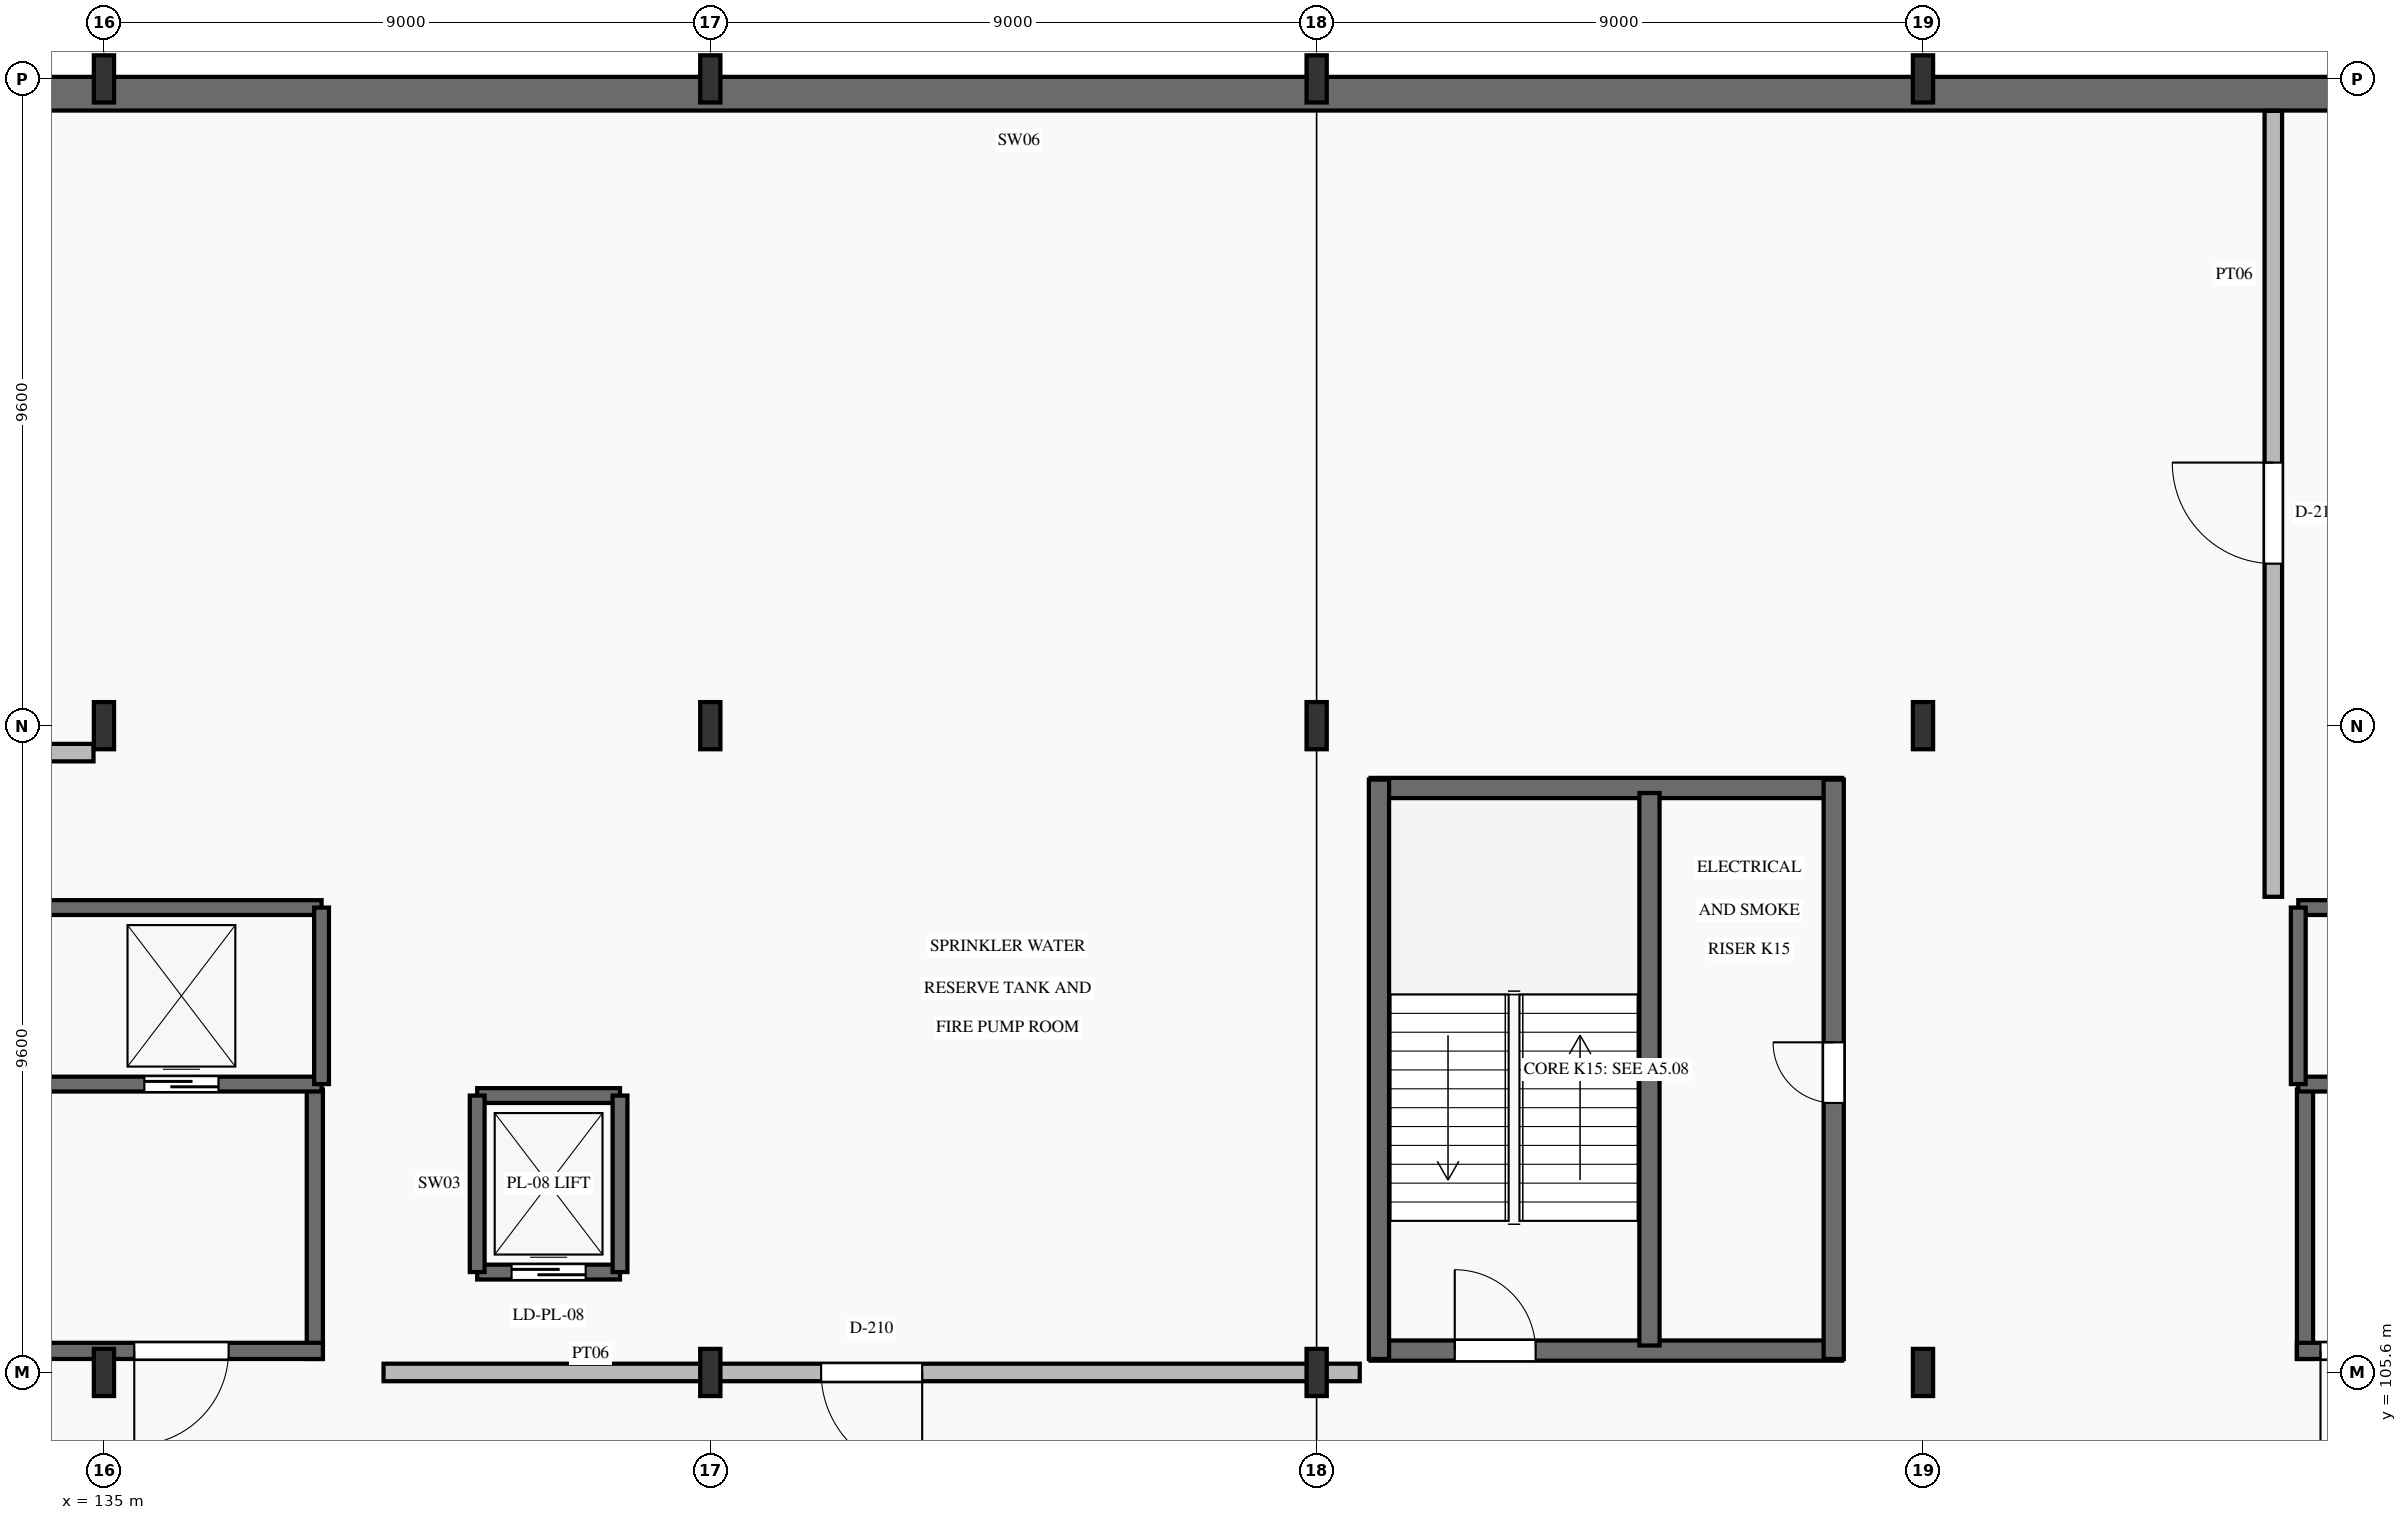
"""IFC4 building model, lengths in metres.
Left out: names, types, materials, properties, quantities, classifications, styles, units other than length and angle.
Written with IfcOpenShell. Run it as: python <this file> out.ifc"""

import sys

from ifc_helpers import new_model, si_unit, direction, frame, frame_2d, origin, origin_2d, place, context, subcontext, project, spatial, rectangle, i_section, extrude, element, fill, save


model = new_model("IFC4")
c1 = context("Model", 3, precision=1e-05, world=origin(), true_north=direction((0.0, 1.0)))
c2 = subcontext(c1, "Body", "Model", "MODEL_VIEW")
j1 = project(units=[si_unit("LENGTHUNIT", "METRE"), si_unit("PLANEANGLEUNIT", "RADIAN")], contexts=[c1])
p1 = place(None, origin())
s1 = spatial("IfcSite", under=j1, at=p1, CompositionType="ELEMENT")
p2 = place(p1, origin())
s2 = spatial("IfcBuilding", under=s1, at=p2, CompositionType="ELEMENT")
p3 = place(p2, frame((0.0, 0.0, -4.5)))
s3 = spatial("IfcBuildingStorey", under=s2, at=p3, CompositionType="ELEMENT", Elevation=-4.5)
for number, where, z_axis, x_axis in (
    (1, (135.0, 105.6, 0.0), (0.0, 0.0, 1.0), (1.0, 0.0, 0.0)),
    (2, (135.0, 115.2, 0.0), (0.0, 0.0, 1.0), (1.0, 0.0, 0.0)),
    (3, (135.0, 124.8, 0.0), (0.0, 0.0, 1.0), (1.0, 0.0, 0.0)),
    (4, (144.0, 105.6, 0.0), (0.0, 0.0, 1.0), (1.0, 0.0, 0.0)),
    (5, (144.0, 115.2, 0.0), (0.0, 0.0, 1.0), (1.0, 0.0, 0.0)),
    (6, (144.0, 124.8, 0.0), (0.0, 0.0, 1.0), (1.0, 0.0, 0.0)),
    (7, (153.0, 105.6, 0.0), (0.0, 0.0, 1.0), (1.0, 0.0, 0.0)),
    (8, (153.0, 115.2, 0.0), (0.0, 0.0, 1.0), (1.0, 0.0, 0.0)),
    (9, (153.0, 124.8, 0.0), (0.0, 0.0, 1.0), (1.0, 0.0, 0.0)),
    (10, (162.0, 105.6, 0.0), (0.0, 0.0, 1.0), (1.0, 0.0, 0.0)),
    (11, (162.0, 115.2, 0.0), (0.0, 0.0, 1.0), (1.0, 0.0, 0.0)),
    (12, (162.0, 124.8, 0.0), (0.0, 0.0, 1.0), (1.0, 0.0, 0.0)),
):
    element("IfcColumn", number, at=place(p3, frame(where, z_axis=z_axis, x_axis=x_axis)), inside=s3, PredefinedType="COLUMN", context=c2, shape_type="SweptSolid", body=[
        extrude(i_section(OverallWidth=0.3, OverallDepth=0.7, WebThickness=0.017, FlangeThickness=0.032, FilletRadius=0.027, at=origin_2d()), origin(), (0.0, 0.0, 1.0), 4.5),
    ])
p4 = place(p3, frame((179.78, 124.58, 0.0), z_axis=(0.0, 0.0, 1.0), x_axis=(-1.0, 0.0, 0.0)))
e13 = element("IfcWall", 13, at=p4, inside=s3, PredefinedType="SHEAR", context=c2, shape_type="SweptSolid", body=[
    extrude(rectangle(XDim=62.4, YDim=0.5, at=frame_2d((31.2, 0.0))), origin(), (0.0, 0.0, 1.0), 4.2),
])
p5 = place(p3, frame((138.13, 105.8, 0.0), z_axis=(0.0, 0.0, 1.0), x_axis=(0.0, 1.0, 0.0)))
e14 = element("IfcWall", 14, at=p5, inside=s3, PredefinedType="SHEAR", context=c2, shape_type="SweptSolid", body=[
    extrude(rectangle(XDim=4.0, YDim=0.24, at=frame_2d((2.0, 0.0))), origin(), (0.0, 0.0, 1.0), 4.5),
])
p6 = place(p3, frame((134.05, 105.92, 0.0), z_axis=(0.0, 0.0, 1.0), x_axis=(1.0, 0.0, 0.0)))
e15 = element("IfcWall", 15, at=p6, inside=s3, PredefinedType="SHEAR", context=c2, shape_type="SweptSolid", body=[
    extrude(rectangle(XDim=4.2, YDim=0.24, at=frame_2d((2.1, 0.0))), origin(), (0.0, 0.0, 1.0), 4.5),
])
p7 = place(p6, frame((1.4, 0.0, 0.0)))
e16 = element("IfcOpeningElement", 16, at=p7, cuts=e15, PredefinedType="OPENING", context=c2, shape_type="SweptSolid", body=[
    extrude(rectangle(XDim=1.4, YDim=2.2, at=frame_2d((0.7, 1.1))), frame((0.0, 0.135, 0.0), z_axis=(0.0, -1.0, 0.0), x_axis=(1.0, 0.0, 0.0)), (0.0, 0.0, 1.0), 0.27),
])
p8 = place(p3, frame((167.67, 105.8, 0.0), z_axis=(0.0, 0.0, 1.0), x_axis=(0.0, 1.0, 0.0)))
e17 = element("IfcWall", 17, at=p8, inside=s3, PredefinedType="SHEAR", context=c2, shape_type="SweptSolid", body=[
    extrude(rectangle(XDim=4.0, YDim=0.24, at=frame_2d((2.0, 0.0))), origin(), (0.0, 0.0, 1.0), 4.5),
])
p9 = place(p3, frame((167.55, 105.92, 0.0), z_axis=(0.0, 0.0, 1.0), x_axis=(1.0, 0.0, 0.0)))
e18 = element("IfcWall", 18, at=p9, inside=s3, PredefinedType="SHEAR", context=c2, shape_type="SweptSolid", body=[
    extrude(rectangle(XDim=4.2, YDim=0.24, at=frame_2d((2.1, 0.0))), origin(), (0.0, 0.0, 1.0), 4.5),
])
p10 = place(p9, frame((0.35, 0.0, 0.0)))
e19 = element("IfcOpeningElement", 19, at=p10, cuts=e18, PredefinedType="OPENING", context=c2, shape_type="SweptSolid", body=[
    extrude(rectangle(XDim=1.4, YDim=2.2, at=frame_2d((0.7, 1.1))), frame((0.0, 0.135, 0.0), z_axis=(0.0, -1.0, 0.0), x_axis=(1.0, 0.0, 0.0)), (0.0, 0.0, 1.0), 0.27),
])
p11 = place(p3, frame((153.8, 105.925, 0.0), z_axis=(0.0, 0.0, 1.0), x_axis=(1.0, 0.0, 0.0)))
e20 = element("IfcWall", 20, at=p11, inside=s3, PredefinedType="SHEAR", context=c2, shape_type="SweptSolid", body=[
    extrude(rectangle(XDim=7.0, YDim=0.3, at=frame_2d((3.5, 0.0))), origin(), (0.0, 0.0, 1.0), 4.5),
])
p12 = place(p11, frame((1.25, 0.0, 0.0)))
e21 = element("IfcOpeningElement", 21, at=p12, cuts=e20, PredefinedType="OPENING", context=c2, shape_type="SweptSolid", body=[
    extrude(rectangle(XDim=1.2, YDim=2.15, at=frame_2d((0.6, 1.075))), frame((0.0, 0.165, 0.0), z_axis=(0.0, -1.0, 0.0), x_axis=(1.0, 0.0, 0.0)), (0.0, 0.0, 1.0), 0.33),
])
p13 = place(p3, frame((153.8, 114.275, 0.0), z_axis=(0.0, 0.0, 1.0), x_axis=(1.0, 0.0, 0.0)))
e22 = element("IfcWall", 22, at=p13, inside=s3, PredefinedType="SHEAR", context=c2, shape_type="SweptSolid", body=[
    extrude(rectangle(XDim=7.0, YDim=0.3, at=frame_2d((3.5, 0.0))), origin(), (0.0, 0.0, 1.0), 4.5),
])
p14 = place(p3, frame((153.925, 105.8, 0.0), z_axis=(0.0, 0.0, 1.0), x_axis=(0.0, 1.0, 0.0)))
e23 = element("IfcWall", 23, at=p14, inside=s3, PredefinedType="SHEAR", context=c2, shape_type="SweptSolid", body=[
    extrude(rectangle(XDim=8.6, YDim=0.3, at=frame_2d((4.3, 0.0))), origin(), (0.0, 0.0, 1.0), 4.5),
])
p15 = place(p3, frame((160.675, 105.8, 0.0), z_axis=(0.0, 0.0, 1.0), x_axis=(0.0, 1.0, 0.0)))
e24 = element("IfcWall", 24, at=p15, inside=s3, PredefinedType="SHEAR", context=c2, shape_type="SweptSolid", body=[
    extrude(rectangle(XDim=8.6, YDim=0.3, at=frame_2d((4.3, 0.0))), origin(), (0.0, 0.0, 1.0), 4.5),
])
p16 = place(p15, frame((3.8, 0.0, 0.0)))
e25 = element("IfcOpeningElement", 25, at=p16, cuts=e24, PredefinedType="OPENING", context=c2, shape_type="SweptSolid", body=[
    extrude(rectangle(XDim=0.9, YDim=2.05, at=frame_2d((0.45, 1.025))), frame((0.0, 0.165, 0.0), z_axis=(0.0, -1.0, 0.0), x_axis=(1.0, 0.0, 0.0)), (0.0, 0.0, 1.0), 0.33),
])
p17 = place(p3, frame((157.94, 106.0, 0.0), z_axis=(0.0, 0.0, 1.0), x_axis=(0.0, 1.0, 0.0)))
e26 = element("IfcWall", 26, at=p17, inside=s3, PredefinedType="SHEAR", context=c2, shape_type="SweptSolid", body=[
    extrude(rectangle(XDim=8.2, YDim=0.3, at=frame_2d((4.1, 0.0))), origin(), (0.0, 0.0, 1.0), 4.5),
])
p18 = place(p3, frame((140.54, 107.09, 0.0), z_axis=(0.0, 0.0, 1.0), x_axis=(1.0, 0.0, 0.0)))
e27 = element("IfcWall", 27, at=p18, inside=s3, PredefinedType="SHEAR", context=c2, shape_type="SweptSolid", body=[
    extrude(rectangle(XDim=2.12, YDim=0.22, at=frame_2d((1.06, 0.0))), origin(), (0.0, 0.0, 1.0), 4.5),
])
p19 = place(p18, frame((0.51, 0.0, 0.0)))
e28 = element("IfcOpeningElement", 28, at=p19, cuts=e27, PredefinedType="OPENING", context=c2, shape_type="SweptSolid", body=[
    extrude(rectangle(XDim=1.1, YDim=2.15, at=frame_2d((0.55, 1.075))), frame((0.0, 0.125, 0.0), z_axis=(0.0, -1.0, 0.0), x_axis=(1.0, 0.0, 0.0)), (0.0, 0.0, 1.0), 0.25),
])
p20 = place(p3, frame((140.54, 109.71, 0.0), z_axis=(0.0, 0.0, 1.0), x_axis=(1.0, 0.0, 0.0)))
e29 = element("IfcWall", 29, at=p20, inside=s3, PredefinedType="SHEAR", context=c2, shape_type="SweptSolid", body=[
    extrude(rectangle(XDim=2.12, YDim=0.22, at=frame_2d((1.06, 0.0))), origin(), (0.0, 0.0, 1.0), 4.5),
])
for number, where, z_axis, x_axis in (
    (30, (140.54, 107.09, 0.0), (0.0, 0.0, 1.0), (0.0, 1.0, 0.0)),
    (31, (142.66, 107.09, 0.0), (0.0, 0.0, 1.0), (0.0, 1.0, 0.0)),
):
    element("IfcWall", number, at=place(p3, frame(where, z_axis=z_axis, x_axis=x_axis)), inside=s3, PredefinedType="SHEAR", context=c2, shape_type="SweptSolid", body=[
        extrude(rectangle(XDim=2.62, YDim=0.22, at=frame_2d((1.31, 0.0))), origin(), (0.0, 0.0, 1.0), 4.5),
    ])
p21 = place(p3, frame((134.07, 109.88, 0.0), z_axis=(0.0, 0.0, 1.0), x_axis=(1.0, 0.0, 0.0)))
e32 = element("IfcWall", 32, at=p21, inside=s3, PredefinedType="SHEAR", context=c2, shape_type="SweptSolid", body=[
    extrude(rectangle(XDim=4.16, YDim=0.22, at=frame_2d((2.08, 0.0))), origin(), (0.0, 0.0, 1.0), 4.5),
])
p22 = place(p21, frame((1.53, 0.0, 0.0)))
e33 = element("IfcOpeningElement", 33, at=p22, cuts=e32, PredefinedType="OPENING", context=c2, shape_type="SweptSolid", body=[
    extrude(rectangle(XDim=1.1, YDim=2.15, at=frame_2d((0.55, 1.075))), frame((0.0, 0.125, 0.0), z_axis=(0.0, -1.0, 0.0), x_axis=(1.0, 0.0, 0.0)), (0.0, 0.0, 1.0), 0.25),
])
p23 = place(p3, frame((134.07, 112.5, 0.0), z_axis=(0.0, 0.0, 1.0), x_axis=(1.0, 0.0, 0.0)))
e34 = element("IfcWall", 34, at=p23, inside=s3, PredefinedType="SHEAR", context=c2, shape_type="SweptSolid", body=[
    extrude(rectangle(XDim=4.16, YDim=0.22, at=frame_2d((2.08, 0.0))), origin(), (0.0, 0.0, 1.0), 4.5),
])
p24 = place(p3, frame((138.23, 109.88, 0.0), z_axis=(0.0, 0.0, 1.0), x_axis=(0.0, 1.0, 0.0)))
e35 = element("IfcWall", 35, at=p24, inside=s3, PredefinedType="SHEAR", context=c2, shape_type="SweptSolid", body=[
    extrude(rectangle(XDim=2.62, YDim=0.22, at=frame_2d((1.31, 0.0))), origin(), (0.0, 0.0, 1.0), 4.5),
])
p25 = place(p3, frame((167.57, 109.88, 0.0), z_axis=(0.0, 0.0, 1.0), x_axis=(1.0, 0.0, 0.0)))
e36 = element("IfcWall", 36, at=p25, inside=s3, PredefinedType="SHEAR", context=c2, shape_type="SweptSolid", body=[
    extrude(rectangle(XDim=4.16, YDim=0.22, at=frame_2d((2.08, 0.0))), origin(), (0.0, 0.0, 1.0), 4.5),
])
p26 = place(p25, frame((1.53, 0.0, 0.0)))
e37 = element("IfcOpeningElement", 37, at=p26, cuts=e36, PredefinedType="OPENING", context=c2, shape_type="SweptSolid", body=[
    extrude(rectangle(XDim=1.1, YDim=2.15, at=frame_2d((0.55, 1.075))), frame((0.0, 0.125, 0.0), z_axis=(0.0, -1.0, 0.0), x_axis=(1.0, 0.0, 0.0)), (0.0, 0.0, 1.0), 0.25),
])
p27 = place(p3, frame((167.57, 112.5, 0.0), z_axis=(0.0, 0.0, 1.0), x_axis=(1.0, 0.0, 0.0)))
e38 = element("IfcWall", 38, at=p27, inside=s3, PredefinedType="SHEAR", context=c2, shape_type="SweptSolid", body=[
    extrude(rectangle(XDim=4.16, YDim=0.22, at=frame_2d((2.08, 0.0))), origin(), (0.0, 0.0, 1.0), 4.5),
])
p28 = place(p3, frame((167.57, 109.88, 0.0), z_axis=(0.0, 0.0, 1.0), x_axis=(0.0, 1.0, 0.0)))
e39 = element("IfcWall", 39, at=p28, inside=s3, PredefinedType="SHEAR", context=c2, shape_type="SweptSolid", body=[
    extrude(rectangle(XDim=2.62, YDim=0.22, at=frame_2d((1.31, 0.0))), origin(), (0.0, 0.0, 1.0), 4.5),
])
p29 = place(p3, frame((139.15, 105.6, 0.0), z_axis=(0.0, 0.0, 1.0), x_axis=(1.0, 0.0, 0.0)))
e40 = element("IfcWall", 40, at=p29, inside=s3, PredefinedType="PARTITIONING", context=c2, shape_type="SweptSolid", body=[
    extrude(rectangle(XDim=14.49, YDim=0.26, at=frame_2d((7.245, 0.0))), origin(), (0.0, 0.0, 1.0), 3.61),
])
p30 = place(p29, frame((6.495, 0.0, 0.0)))
e41 = element("IfcOpeningElement", 41, at=p30, cuts=e40, PredefinedType="OPENING", context=c2, shape_type="SweptSolid", body=[
    extrude(rectangle(XDim=1.5, YDim=2.25, at=frame_2d((0.75, 1.125))), frame((0.0, 0.145, 0.0), z_axis=(0.0, -1.0, 0.0), x_axis=(1.0, 0.0, 0.0)), (0.0, 0.0, 1.0), 0.29),
])
p31 = place(p3, frame((117.75, 114.8, 0.0), z_axis=(0.0, 0.0, 1.0), x_axis=(1.0, 0.0, 0.0)))
e42 = element("IfcWall", 42, at=p31, inside=s3, PredefinedType="PARTITIONING", context=c2, shape_type="SweptSolid", body=[
    extrude(rectangle(XDim=17.095, YDim=0.26, at=frame_2d((8.547, 0.0))), origin(), (0.0, 0.0, 1.0), 3.61),
])
p32 = place(p31, frame((5.2, 0.0, 0.0)))
e43 = element("IfcOpeningElement", 43, at=p32, cuts=e42, PredefinedType="OPENING", context=c2, shape_type="SweptSolid", body=[
    extrude(rectangle(XDim=1.5, YDim=2.25, at=frame_2d((0.75, 1.125))), frame((0.0, 0.145, 0.0), z_axis=(0.0, -1.0, 0.0), x_axis=(1.0, 0.0, 0.0)), (0.0, 0.0, 1.0), 0.29),
])
p33 = place(p3, frame((167.2, 112.66, 0.0), z_axis=(0.0, 0.0, 1.0), x_axis=(0.0, 1.0, 0.0)))
e44 = element("IfcWall", 44, at=p33, inside=s3, PredefinedType="PARTITIONING", context=c2, shape_type="SweptSolid", body=[
    extrude(rectangle(XDim=11.665, YDim=0.26, at=frame_2d((5.833, 0.0))), origin(), (0.0, 0.0, 1.0), 4.2),
])
p34 = place(p33, frame((4.945, 0.0, 0.0)))
e45 = element("IfcOpeningElement", 45, at=p34, cuts=e44, PredefinedType="OPENING", context=c2, shape_type="SweptSolid", body=[
    extrude(rectangle(XDim=1.5, YDim=2.25, at=frame_2d((0.75, 1.125))), frame((0.0, 0.145, 0.0), z_axis=(0.0, -1.0, 0.0), x_axis=(1.0, 0.0, 0.0)), (0.0, 0.0, 1.0), 0.29),
])
p35 = place(p7, frame((1.4, 0.0, 0.0), z_axis=(0.0, 0.0, 1.0), x_axis=(-1.0, 0.0, 0.0)))
e46 = element("IfcDoor", 46, at=p35, inside=s3, OperationType="SINGLE_SWING_LEFT", PredefinedType="DOOR", context=c2, shape_type="SweptSolid", body=[
    extrude(rectangle(XDim=1.4, YDim=2.2, at=frame_2d((0.7, 1.1))), frame((0.0, 0.025, 0.0), z_axis=(0.0, -1.0, 0.0), x_axis=(1.0, 0.0, 0.0)), (0.0, 0.0, 1.0), 0.05),
])
fill(e16, e46)
p36 = place(p10, frame((1.4, 0.0, 0.0), z_axis=(0.0, 0.0, 1.0), x_axis=(-1.0, 0.0, 0.0)))
e47 = element("IfcDoor", 47, at=p36, inside=s3, OperationType="SINGLE_SWING_LEFT", PredefinedType="DOOR", context=c2, shape_type="SweptSolid", body=[
    extrude(rectangle(XDim=1.4, YDim=2.2, at=frame_2d((0.7, 1.1))), frame((0.0, 0.025, 0.0), z_axis=(0.0, -1.0, 0.0), x_axis=(1.0, 0.0, 0.0)), (0.0, 0.0, 1.0), 0.05),
])
fill(e19, e47)
p37 = place(p12, origin())
e48 = element("IfcDoor", 48, at=p37, inside=s3, OperationType="SINGLE_SWING_LEFT", PredefinedType="DOOR", context=c2, shape_type="SweptSolid", body=[
    extrude(rectangle(XDim=1.2, YDim=2.15, at=frame_2d((0.6, 1.075))), frame((0.0, 0.025, 0.0), z_axis=(0.0, -1.0, 0.0), x_axis=(1.0, 0.0, 0.0)), (0.0, 0.0, 1.0), 0.05),
])
fill(e21, e48)
p38 = place(p16, origin())
e49 = element("IfcDoor", 49, at=p38, inside=s3, OperationType="SINGLE_SWING_RIGHT", PredefinedType="DOOR", context=c2, shape_type="SweptSolid", body=[
    extrude(rectangle(XDim=0.9, YDim=2.05, at=frame_2d((0.45, 1.025))), frame((0.0, 0.025, 0.0), z_axis=(0.0, -1.0, 0.0), x_axis=(1.0, 0.0, 0.0)), (0.0, 0.0, 1.0), 0.05),
])
fill(e25, e49)
p39 = place(p19, origin())
e50 = element("IfcDoor", 50, at=p39, inside=s3, OperationType="SLIDING_TO_RIGHT", PredefinedType="DOOR", context=c2, shape_type="SweptSolid", body=[
    extrude(rectangle(XDim=1.1, YDim=2.15, at=frame_2d((0.55, 1.075))), frame((0.0, 0.025, 0.0), z_axis=(0.0, -1.0, 0.0), x_axis=(1.0, 0.0, 0.0)), (0.0, 0.0, 1.0), 0.05),
])
fill(e28, e50)
p40 = place(p22, origin())
e51 = element("IfcDoor", 51, at=p40, inside=s3, OperationType="SLIDING_TO_RIGHT", PredefinedType="DOOR", context=c2, shape_type="SweptSolid", body=[
    extrude(rectangle(XDim=1.1, YDim=2.15, at=frame_2d((0.55, 1.075))), frame((0.0, 0.025, 0.0), z_axis=(0.0, -1.0, 0.0), x_axis=(1.0, 0.0, 0.0)), (0.0, 0.0, 1.0), 0.05),
])
fill(e33, e51)
p41 = place(p30, frame((1.5, 0.0, 0.0), z_axis=(0.0, 0.0, 1.0), x_axis=(-1.0, 0.0, 0.0)))
e52 = element("IfcDoor", 52, at=p41, inside=s3, OperationType="SINGLE_SWING_RIGHT", PredefinedType="DOOR", context=c2, shape_type="SweptSolid", body=[
    extrude(rectangle(XDim=1.5, YDim=2.25, at=frame_2d((0.75, 1.125))), frame((0.0, 0.025, 0.0), z_axis=(0.0, -1.0, 0.0), x_axis=(1.0, 0.0, 0.0)), (0.0, 0.0, 1.0), 0.05),
])
fill(e41, e52)
p42 = place(p34, origin())
e53 = element("IfcDoor", 53, at=p42, inside=s3, OperationType="SINGLE_SWING_RIGHT", PredefinedType="DOOR", context=c2, shape_type="SweptSolid", body=[
    extrude(rectangle(XDim=1.5, YDim=2.25, at=frame_2d((0.75, 1.125))), frame((0.0, 0.025, 0.0), z_axis=(0.0, -1.0, 0.0), x_axis=(1.0, 0.0, 0.0)), (0.0, 0.0, 1.0), 0.05),
])
fill(e45, e53)
save(model, sys.argv[1])
